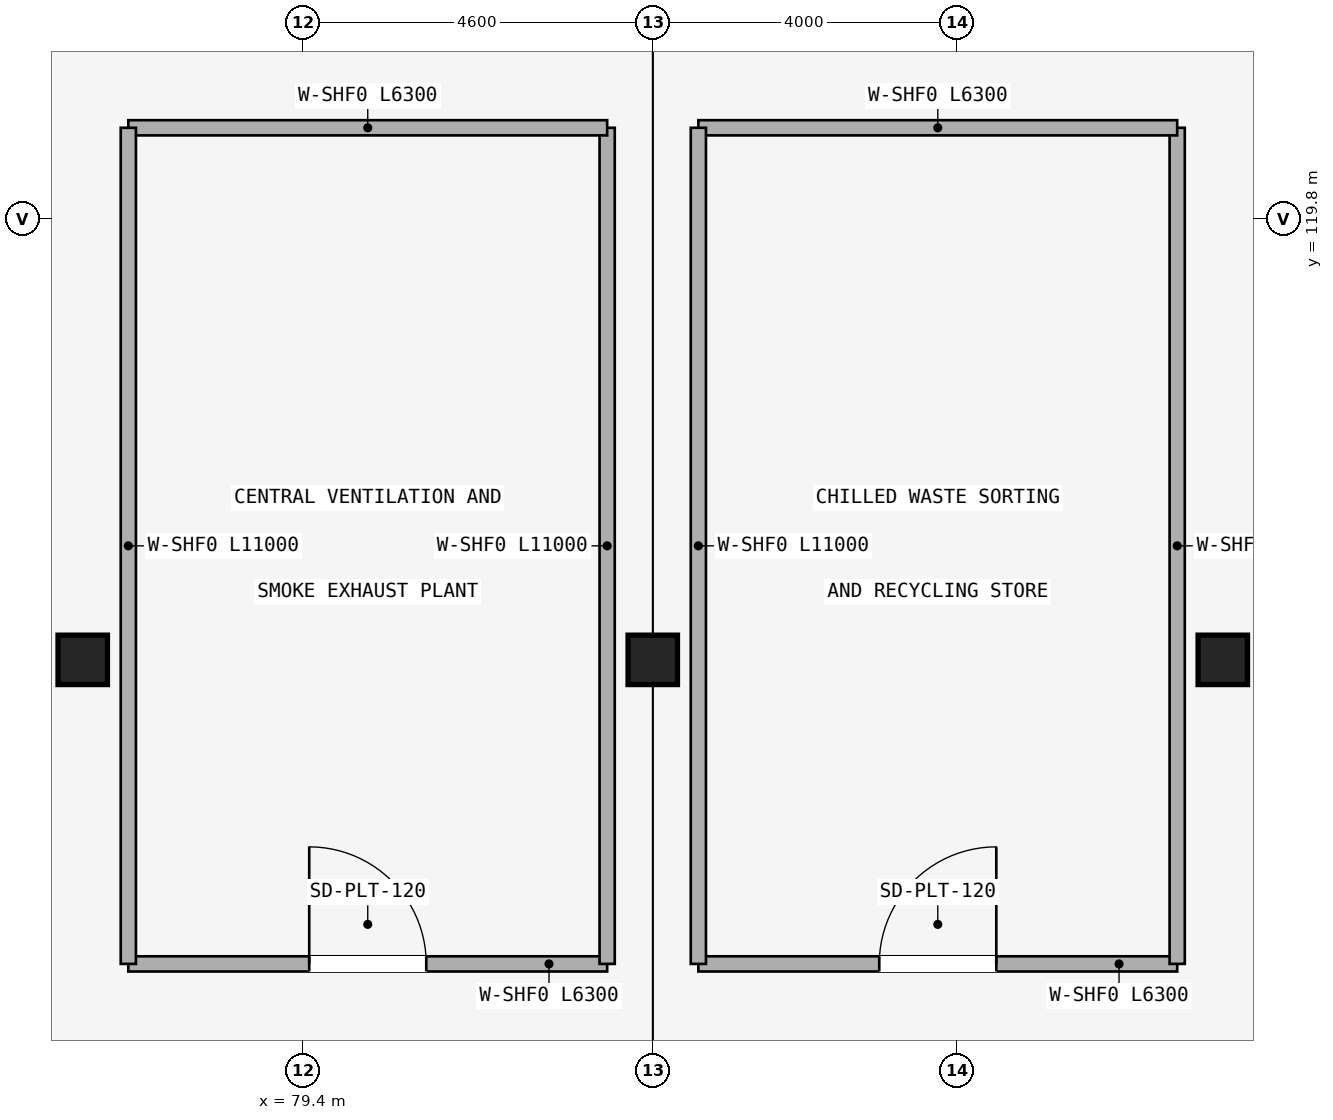
"""IFC4 building model, lengths in metres.
Left out: names, types, materials, properties, quantities, classifications, styles, units other than length and angle.
Written with IfcOpenShell. Run it as: python <this file> out.ifc"""

import sys

from ifc_helpers import new_model, si_unit, direction, frame, frame_2d, origin, origin_2d, place, context, subcontext, project, spatial, rectangle, extrude, element, fill, save


model = new_model("IFC4")
c1 = context("Model", 3, precision=1e-05, world=origin(), true_north=direction((0.0, 1.0)))
c2 = subcontext(c1, "Body", "Model", "MODEL_VIEW")
j1 = project(units=[si_unit("LENGTHUNIT", "METRE"), si_unit("PLANEANGLEUNIT", "RADIAN")], contexts=[c1])
p1 = place(None, origin())
s1 = spatial("IfcSite", under=j1, at=p1, CompositionType="ELEMENT")
p2 = place(p1, origin())
s2 = spatial("IfcBuilding", under=s1, at=p2, CompositionType="ELEMENT")
p3 = place(p2, frame((0.0, 0.0, -4.5)))
s3 = spatial("IfcBuildingStorey", under=s2, at=p3, CompositionType="ELEMENT", Elevation=-4.5)
for number, where, z_axis, x_axis in (
    (1, (76.5, 114.0, 0.0), (0.0, 0.0, 1.0), (1.0, 0.0, 0.0)),
    (2, (84.0, 114.0, 0.0), (0.0, 0.0, 1.0), (1.0, 0.0, 0.0)),
    (3, (91.5, 114.0, 0.0), (0.0, 0.0, 1.0), (1.0, 0.0, 0.0)),
):
    element("IfcColumn", number, at=place(p3, frame(where, z_axis=z_axis, x_axis=x_axis)), inside=s3, PredefinedType="COLUMN", context=c2, shape_type="SweptSolid", body=[
        extrude(rectangle(XDim=0.65, YDim=0.65, at=origin_2d()), origin(), (0.0, 0.0, 1.0), 4.2),
    ])
p4 = place(p3, frame((77.1, 110.0, 0.0), z_axis=(0.0, 0.0, 1.0), x_axis=(1.0, 0.0, 0.0)))
e4 = element("IfcWall", 4, at=p4, inside=s3, PredefinedType="STANDARD", context=c2, shape_type="SweptSolid", body=[
    extrude(rectangle(XDim=6.3, YDim=0.2, at=frame_2d((3.15, 0.0))), origin(), (0.0, 0.0, 1.0), 4.18),
])
p5 = place(p4, frame((2.38, 0.0, 0.0)))
e5 = element("IfcOpeningElement", 5, at=p5, cuts=e4, PredefinedType="OPENING", context=c2, shape_type="SweptSolid", body=[
    extrude(rectangle(XDim=1.54, YDim=2.15, at=frame_2d((0.77, 1.075))), frame((0.0, 0.11, 0.0), z_axis=(0.0, -1.0, 0.0), x_axis=(1.0, 0.0, 0.0)), (0.0, 0.0, 1.0), 0.22),
])
p6 = place(p3, frame((83.4, 110.0, 0.0), z_axis=(0.0, 0.0, 1.0), x_axis=(0.0, 1.0, 0.0)))
e6 = element("IfcWall", 6, at=p6, inside=s3, PredefinedType="STANDARD", context=c2, shape_type="SweptSolid", body=[
    extrude(rectangle(XDim=11.0, YDim=0.2, at=frame_2d((5.5, 0.0))), origin(), (0.0, 0.0, 1.0), 3.492),
])
p7 = place(p3, frame((83.4, 121.0, 0.0), z_axis=(0.0, 0.0, 1.0), x_axis=(-1.0, 0.0, 0.0)))
e7 = element("IfcWall", 7, at=p7, inside=s3, PredefinedType="STANDARD", context=c2, shape_type="SweptSolid", body=[
    extrude(rectangle(XDim=6.3, YDim=0.2, at=frame_2d((3.15, 0.0))), origin(), (0.0, 0.0, 1.0), 4.18),
])
p8 = place(p3, frame((77.1, 121.0, 0.0), z_axis=(0.0, 0.0, 1.0), x_axis=(0.0, -1.0, 0.0)))
e8 = element("IfcWall", 8, at=p8, inside=s3, PredefinedType="STANDARD", context=c2, shape_type="SweptSolid", body=[
    extrude(rectangle(XDim=11.0, YDim=0.2, at=frame_2d((5.5, 0.0))), origin(), (0.0, 0.0, 1.0), 3.492),
])
p9 = place(p3, frame((84.6, 110.0, 0.0), z_axis=(0.0, 0.0, 1.0), x_axis=(1.0, 0.0, 0.0)))
e9 = element("IfcWall", 9, at=p9, inside=s3, PredefinedType="STANDARD", context=c2, shape_type="SweptSolid", body=[
    extrude(rectangle(XDim=6.3, YDim=0.2, at=frame_2d((3.15, 0.0))), origin(), (0.0, 0.0, 1.0), 4.18),
])
p10 = place(p9, frame((2.38, 0.0, 0.0)))
e10 = element("IfcOpeningElement", 10, at=p10, cuts=e9, PredefinedType="OPENING", context=c2, shape_type="SweptSolid", body=[
    extrude(rectangle(XDim=1.54, YDim=2.15, at=frame_2d((0.77, 1.075))), frame((0.0, 0.11, 0.0), z_axis=(0.0, -1.0, 0.0), x_axis=(1.0, 0.0, 0.0)), (0.0, 0.0, 1.0), 0.22),
])
p11 = place(p3, frame((90.9, 110.0, 0.0), z_axis=(0.0, 0.0, 1.0), x_axis=(0.0, 1.0, 0.0)))
e11 = element("IfcWall", 11, at=p11, inside=s3, PredefinedType="STANDARD", context=c2, shape_type="SweptSolid", body=[
    extrude(rectangle(XDim=11.0, YDim=0.2, at=frame_2d((5.5, 0.0))), origin(), (0.0, 0.0, 1.0), 3.492),
])
p12 = place(p3, frame((90.9, 121.0, 0.0), z_axis=(0.0, 0.0, 1.0), x_axis=(-1.0, 0.0, 0.0)))
e12 = element("IfcWall", 12, at=p12, inside=s3, PredefinedType="STANDARD", context=c2, shape_type="SweptSolid", body=[
    extrude(rectangle(XDim=6.3, YDim=0.2, at=frame_2d((3.15, 0.0))), origin(), (0.0, 0.0, 1.0), 4.18),
])
p13 = place(p3, frame((84.6, 121.0, 0.0), z_axis=(0.0, 0.0, 1.0), x_axis=(0.0, -1.0, 0.0)))
e13 = element("IfcWall", 13, at=p13, inside=s3, PredefinedType="STANDARD", context=c2, shape_type="SweptSolid", body=[
    extrude(rectangle(XDim=11.0, YDim=0.2, at=frame_2d((5.5, 0.0))), origin(), (0.0, 0.0, 1.0), 3.492),
])
p14 = place(p5, frame((1.54, 0.0, 0.0), z_axis=(0.0, 0.0, 1.0), x_axis=(-1.0, 0.0, 0.0)))
e14 = element("IfcDoor", 14, at=p14, inside=s3, OperationType="SINGLE_SWING_RIGHT", PredefinedType="DOOR", context=c2, shape_type="SweptSolid", body=[
    extrude(rectangle(XDim=1.54, YDim=2.15, at=frame_2d((0.77, 1.075))), frame((0.0, 0.025, 0.0), z_axis=(0.0, -1.0, 0.0), x_axis=(1.0, 0.0, 0.0)), (0.0, 0.0, 1.0), 0.05),
])
fill(e5, e14)
p15 = place(p10, frame((1.54, 0.0, 0.0), z_axis=(0.0, 0.0, 1.0), x_axis=(-1.0, 0.0, 0.0)))
e15 = element("IfcDoor", 15, at=p15, inside=s3, OperationType="SINGLE_SWING_LEFT", PredefinedType="DOOR", context=c2, shape_type="SweptSolid", body=[
    extrude(rectangle(XDim=1.54, YDim=2.15, at=frame_2d((0.77, 1.075))), frame((0.0, 0.025, 0.0), z_axis=(0.0, -1.0, 0.0), x_axis=(1.0, 0.0, 0.0)), (0.0, 0.0, 1.0), 0.05),
])
fill(e10, e15)
save(model, sys.argv[1])
